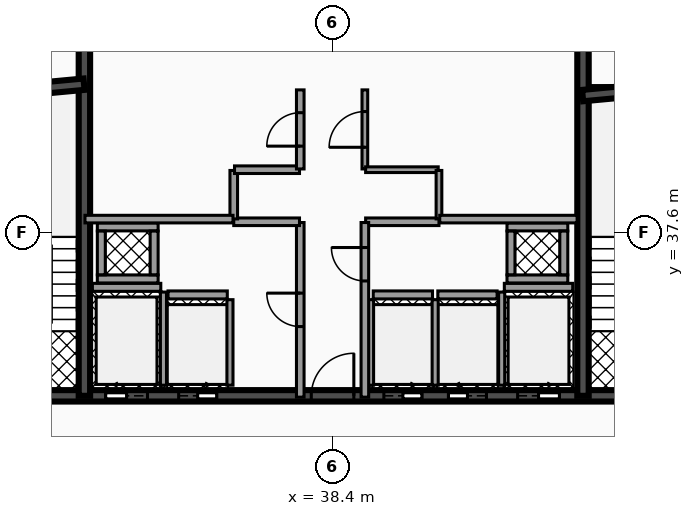
"""IFC4 building model, lengths in metres.
Left out: names, types, materials, properties, quantities, classifications, styles, units other than length and angle.
Written with IfcOpenShell. Run it as: python <this file> out.ifc"""

import sys

from ifc_helpers import new_model, si_unit, direction, frame, frame_2d, origin, place, context, subcontext, project, spatial, rectangle, extrude, element, fill, save


model = new_model("IFC4")
c1 = context("Model", 3, precision=1e-05, world=origin(), true_north=direction((0.0, 1.0)))
c2 = subcontext(c1, "Body", "Model", "MODEL_VIEW")
j1 = project(units=[si_unit("LENGTHUNIT", "METRE"), si_unit("PLANEANGLEUNIT", "RADIAN")], contexts=[c1])
p1 = place(None, origin())
s1 = spatial("IfcSite", under=j1, at=p1, CompositionType="ELEMENT")
p2 = place(p1, origin())
s2 = spatial("IfcBuilding", under=s1, at=p2, CompositionType="ELEMENT")
p3 = place(p2, frame((0.0, 0.0, 232.56)))
s3 = spatial("IfcBuildingStorey", under=s2, at=p3, CompositionType="ELEMENT", Elevation=232.56)
p4 = place(p3, frame((28.5, 33.3, 0.0), z_axis=(0.0, 0.0, 1.0), x_axis=(1.0, 0.0, 0.0)))
e1 = element("IfcWall", 1, at=p4, inside=s3, PredefinedType="SHEAR", context=c2, shape_type="SweptSolid", body=[
    extrude(rectangle(XDim=19.86, YDim=0.3, at=frame_2d((9.93, 0.0))), origin(), (0.0, 0.0, 1.0), 3.18),
])
p5 = place(p4, frame((3.93, 0.0, 0.0)))
e2 = element("IfcOpeningElement", 2, at=p5, cuts=e1, PredefinedType="OPENING", context=c2, shape_type="SweptSolid", body=[
    extrude(rectangle(XDim=1.1, YDim=2.15, at=frame_2d((0.55, 1.075))), frame((0.0, 0.16, 0.0), z_axis=(0.0, -1.0, 0.0), x_axis=(1.0, 0.0, 0.0)), (0.0, 0.0, 1.0), 0.32),
])
p6 = place(p4, frame((14.77, 0.0, 0.0)))
e3 = element("IfcOpeningElement", 3, at=p6, cuts=e1, PredefinedType="OPENING", context=c2, shape_type="SweptSolid", body=[
    extrude(rectangle(XDim=1.1, YDim=2.15, at=frame_2d((0.55, 1.075))), frame((0.0, 0.16, 0.0), z_axis=(0.0, -1.0, 0.0), x_axis=(1.0, 0.0, 0.0)), (0.0, 0.0, 1.0), 0.32),
])
p7 = place(p4, frame((11.25, 0.0, 0.0)))
e4 = element("IfcOpeningElement", 4, at=p7, cuts=e1, PredefinedType="OPENING", context=c2, shape_type="SweptSolid", body=[
    extrude(rectangle(XDim=1.0, YDim=2.1, at=frame_2d((0.5, 1.05))), frame((0.0, 0.16, 0.0), z_axis=(0.0, -1.0, 0.0), x_axis=(1.0, 0.0, 0.0)), (0.0, 0.0, 1.0), 0.32),
])
p8 = place(p4, frame((12.95, 0.0, 0.0)))
e5 = element("IfcOpeningElement", 5, at=p8, cuts=e1, PredefinedType="OPENING", context=c2, shape_type="SweptSolid", body=[
    extrude(rectangle(XDim=1.0, YDim=2.1, at=frame_2d((0.5, 1.05))), frame((0.0, 0.16, 0.0), z_axis=(0.0, -1.0, 0.0), x_axis=(1.0, 0.0, 0.0)), (0.0, 0.0, 1.0), 0.32),
])
p9 = place(p4, frame((5.85, 0.0, 0.0)))
e6 = element("IfcOpeningElement", 6, at=p9, cuts=e1, PredefinedType="OPENING", context=c2, shape_type="SweptSolid", body=[
    extrude(rectangle(XDim=1.0, YDim=2.1, at=frame_2d((0.5, 1.05))), frame((0.0, 0.16, 0.0), z_axis=(0.0, -1.0, 0.0), x_axis=(1.0, 0.0, 0.0)), (0.0, 0.0, 1.0), 0.32),
])
p10 = place(p4, frame((1.21, 0.0, 0.0)))
e7 = element("IfcOpeningElement", 7, at=p10, cuts=e1, PredefinedType="OPENING", context=c2, shape_type="SweptSolid", body=[
    extrude(rectangle(XDim=1.1, YDim=2.2, at=frame_2d((0.55, 1.1))), frame((0.0, 0.16, 0.0), z_axis=(0.0, -1.0, 0.0), x_axis=(1.0, 0.0, 0.0)), (0.0, 0.0, 1.0), 0.32),
])
p11 = place(p4, frame((9.34, 0.0, 0.0)))
e8 = element("IfcOpeningElement", 8, at=p11, cuts=e1, PredefinedType="OPENING", context=c2, shape_type="SweptSolid", body=[
    extrude(rectangle(XDim=1.12, YDim=2.05, at=frame_2d((0.56, 1.025))), frame((0.0, 0.16, 0.0), z_axis=(0.0, -1.0, 0.0), x_axis=(1.0, 0.0, 0.0)), (0.0, 0.0, 1.0), 0.32),
])
p12 = place(p4, frame((17.55, 0.0, 0.0)))
e9 = element("IfcOpeningElement", 9, at=p12, cuts=e1, PredefinedType="OPENING", context=c2, shape_type="SweptSolid", body=[
    extrude(rectangle(XDim=1.1, YDim=2.2, at=frame_2d((0.55, 1.1))), frame((0.0, 0.16, 0.0), z_axis=(0.0, -1.0, 0.0), x_axis=(1.0, 0.0, 0.0)), (0.0, 0.0, 1.0), 0.32),
])
for number, where, z_axis, x_axis in (
    (10, (31.87, 33.3, 0.0), (0.0, 0.0, 1.0), (0.0, 1.0, 0.0)),
    (11, (44.99, 33.3, 0.0), (0.0, 0.0, 1.0), (0.0, 1.0, 0.0)),
):
    element("IfcWall", number, at=place(p3, frame(where, z_axis=z_axis, x_axis=x_axis)), inside=s3, PredefinedType="SHEAR", context=c2, shape_type="SweptSolid", body=[
        extrude(rectangle(XDim=10.1, YDim=0.3, at=frame_2d((5.05, 0.0))), origin(), (0.0, 0.0, 1.0), 3.18),
    ])
p13 = place(p3, frame((28.64, 41.2, 0.0), z_axis=(0.0, 0.0, 1.0), x_axis=(0.995687118776, 0.092774789157, 0.0)))
e12 = element("IfcWall", 12, at=p13, inside=s3, PredefinedType="SHEAR", context=c2, shape_type="SweptSolid", body=[
    extrude(rectangle(XDim=3.234, YDim=0.3, at=frame_2d((1.617, 0.0))), origin(), (0.0, 0.0, 1.0), 3.18),
])
p14 = place(p3, frame((44.98, 41.2, 0.0), z_axis=(0.0, 0.0, 1.0), x_axis=(0.995686468965, 0.09278176286, 0.0)))
e13 = element("IfcWall", 13, at=p14, inside=s3, PredefinedType="SHEAR", context=c2, shape_type="SweptSolid", body=[
    extrude(rectangle(XDim=3.234, YDim=0.3, at=frame_2d((1.617, 0.0))), origin(), (0.0, 0.0, 1.0), 3.18),
])
p15 = place(p3, frame((32.08, 36.155, 0.0), z_axis=(0.0, 0.0, 1.0), x_axis=(1.0, 0.0, 0.0)))
e14 = element("IfcWall", 14, at=p15, inside=s3, PredefinedType="SOLIDWALL", context=c2, shape_type="SweptSolid", body=[
    extrude(rectangle(XDim=1.8, YDim=0.21, at=frame_2d((0.9, 0.0))), origin(), (0.0, 0.0, 1.0), 3.18),
])
p16 = place(p3, frame((33.95, 33.58, 0.0), z_axis=(0.0, 0.0, 1.0), x_axis=(0.0, 1.0, 0.0)))
e15 = element("IfcWall", 15, at=p16, inside=s3, PredefinedType="SOLIDWALL", context=c2, shape_type="SweptSolid", body=[
    extrude(rectangle(XDim=2.45, YDim=0.16, at=frame_2d((1.225, 0.0))), origin(), (0.0, 0.0, 1.0), 3.18),
])
p17 = place(p3, frame((42.92, 36.155, 0.0), z_axis=(0.0, 0.0, 1.0), x_axis=(1.0, 0.0, 0.0)))
e16 = element("IfcWall", 16, at=p17, inside=s3, PredefinedType="SOLIDWALL", context=c2, shape_type="SweptSolid", body=[
    extrude(rectangle(XDim=1.8, YDim=0.21, at=frame_2d((0.9, 0.0))), origin(), (0.0, 0.0, 1.0), 3.18),
])
p18 = place(p3, frame((42.85, 33.58, 0.0), z_axis=(0.0, 0.0, 1.0), x_axis=(0.0, 1.0, 0.0)))
e17 = element("IfcWall", 17, at=p18, inside=s3, PredefinedType="SOLIDWALL", context=c2, shape_type="SweptSolid", body=[
    extrude(rectangle(XDim=2.45, YDim=0.16, at=frame_2d((1.225, 0.0))), origin(), (0.0, 0.0, 1.0), 3.18),
])
p19 = place(p3, frame((39.47, 35.955, 0.0), z_axis=(0.0, 0.0, 1.0), x_axis=(1.0, 0.0, 0.0)))
e18 = element("IfcWall", 18, at=p19, inside=s3, PredefinedType="SOLIDWALL", context=c2, shape_type="SweptSolid", body=[
    extrude(rectangle(XDim=1.56, YDim=0.21, at=frame_2d((0.78, 0.0))), origin(), (0.0, 0.0, 1.0), 3.18),
])
for number, where, z_axis, x_axis in (
    (19, (39.4, 33.58, 0.0), (0.0, 0.0, 1.0), (0.0, 1.0, 0.0)),
    (20, (41.1, 33.58, 0.0), (0.0, 0.0, 1.0), (0.0, 1.0, 0.0)),
):
    element("IfcWall", number, at=place(p3, frame(where, z_axis=z_axis, x_axis=x_axis)), inside=s3, PredefinedType="SOLIDWALL", context=c2, shape_type="SweptSolid", body=[
        extrude(rectangle(XDim=2.25, YDim=0.16, at=frame_2d((1.125, 0.0))), origin(), (0.0, 0.0, 1.0), 3.18),
    ])
p20 = place(p3, frame((41.17, 35.955, 0.0), z_axis=(0.0, 0.0, 1.0), x_axis=(1.0, 0.0, 0.0)))
e21 = element("IfcWall", 21, at=p20, inside=s3, PredefinedType="SOLIDWALL", context=c2, shape_type="SweptSolid", body=[
    extrude(rectangle(XDim=1.56, YDim=0.21, at=frame_2d((0.78, 0.0))), origin(), (0.0, 0.0, 1.0), 3.18),
])
p21 = place(p3, frame((34.07, 35.955, 0.0), z_axis=(0.0, 0.0, 1.0), x_axis=(1.0, 0.0, 0.0)))
e22 = element("IfcWall", 22, at=p21, inside=s3, PredefinedType="SOLIDWALL", context=c2, shape_type="SweptSolid", body=[
    extrude(rectangle(XDim=1.56, YDim=0.21, at=frame_2d((0.78, 0.0))), origin(), (0.0, 0.0, 1.0), 3.18),
])
p22 = place(p3, frame((35.7, 33.58, 0.0), z_axis=(0.0, 0.0, 1.0), x_axis=(0.0, 1.0, 0.0)))
e23 = element("IfcWall", 23, at=p22, inside=s3, PredefinedType="SOLIDWALL", context=c2, shape_type="SweptSolid", body=[
    extrude(rectangle(XDim=2.25, YDim=0.16, at=frame_2d((1.125, 0.0))), origin(), (0.0, 0.0, 1.0), 3.18),
])
for number, where, z_axis, x_axis in (
    (24, (32.21, 36.375, 0.0), (0.0, 0.0, 1.0), (1.0, 0.0, 0.0)),
    (25, (32.21, 37.745, 0.0), (0.0, 0.0, 1.0), (1.0, 0.0, 0.0)),
):
    element("IfcWall", number, at=place(p3, frame(where, z_axis=z_axis, x_axis=x_axis)), inside=s3, PredefinedType="SOLIDWALL", context=c2, shape_type="SweptSolid", body=[
        extrude(rectangle(XDim=1.6, YDim=0.21, at=frame_2d((0.8, 0.0))), origin(), (0.0, 0.0, 1.0), 3.18),
    ])
for number, where, z_axis, x_axis in (
    (26, (32.315, 36.485, 0.0), (0.0, 0.0, 1.0), (0.0, 1.0, 0.0)),
    (27, (33.705, 36.485, 0.0), (0.0, 0.0, 1.0), (0.0, 1.0, 0.0)),
):
    element("IfcWall", number, at=place(p3, frame(where, z_axis=z_axis, x_axis=x_axis)), inside=s3, PredefinedType="SOLIDWALL", context=c2, shape_type="SweptSolid", body=[
        extrude(rectangle(XDim=1.15, YDim=0.21, at=frame_2d((0.575, 0.0))), origin(), (0.0, 0.0, 1.0), 3.18),
    ])
for number, where, z_axis, x_axis in (
    (28, (42.99, 36.375, 0.0), (0.0, 0.0, 1.0), (1.0, 0.0, 0.0)),
    (29, (42.99, 37.745, 0.0), (0.0, 0.0, 1.0), (1.0, 0.0, 0.0)),
):
    element("IfcWall", number, at=place(p3, frame(where, z_axis=z_axis, x_axis=x_axis)), inside=s3, PredefinedType="SOLIDWALL", context=c2, shape_type="SweptSolid", body=[
        extrude(rectangle(XDim=1.6, YDim=0.21, at=frame_2d((0.8, 0.0))), origin(), (0.0, 0.0, 1.0), 3.18),
    ])
for number, where, z_axis, x_axis in (
    (30, (43.095, 36.485, 0.0), (0.0, 0.0, 1.0), (0.0, 1.0, 0.0)),
    (31, (44.485, 36.485, 0.0), (0.0, 0.0, 1.0), (0.0, 1.0, 0.0)),
):
    element("IfcWall", number, at=place(p3, frame(where, z_axis=z_axis, x_axis=x_axis)), inside=s3, PredefinedType="SOLIDWALL", context=c2, shape_type="SweptSolid", body=[
        extrude(rectangle(XDim=1.15, YDim=0.21, at=frame_2d((0.575, 0.0))), origin(), (0.0, 0.0, 1.0), 3.18),
    ])
p23 = place(p3, frame((37.55, 33.265, 0.0), z_axis=(0.0, 0.0, 1.0), x_axis=(0.0, 1.0, 0.0)))
e32 = element("IfcWall", 32, at=p23, inside=s3, PredefinedType="PARTITIONING", context=c2, shape_type="SweptSolid", body=[
    extrude(rectangle(XDim=4.595, YDim=0.2, at=frame_2d((2.298, 0.0))), origin(), (0.0, 0.0, 1.0), 2.235),
])
p24 = place(p23, frame((1.857, 0.0, 0.0)))
e33 = element("IfcOpeningElement", 33, at=p24, cuts=e32, PredefinedType="OPENING", context=c2, shape_type="SweptSolid", body=[
    extrude(rectangle(XDim=0.88, YDim=2.05, at=frame_2d((0.44, 1.025))), frame((0.0, 0.11, 0.0), z_axis=(0.0, -1.0, 0.0), x_axis=(1.0, 0.0, 0.0)), (0.0, 0.0, 1.0), 0.22),
])
p25 = place(p3, frame((35.8, 37.88, 0.0), z_axis=(0.0, 0.0, 1.0), x_axis=(1.0, 0.0, 0.0)))
e34 = element("IfcWall", 34, at=p25, inside=s3, PredefinedType="PARTITIONING", context=c2, shape_type="SweptSolid", body=[
    extrude(rectangle(XDim=1.73, YDim=0.2, at=frame_2d((0.865, 0.0))), origin(), (0.0, 0.0, 1.0), 2.235),
])
p26 = place(p3, frame((35.8, 37.955, 0.0), z_axis=(0.0, 0.0, 1.0), x_axis=(0.0, 1.0, 0.0)))
e35 = element("IfcWall", 35, at=p26, inside=s3, PredefinedType="PARTITIONING", context=c2, shape_type="SweptSolid", body=[
    extrude(rectangle(XDim=1.275, YDim=0.2, at=frame_2d((0.637, 0.0))), origin(), (0.0, 0.0, 1.0), 2.235),
])
p27 = place(p3, frame((35.82, 39.25, 0.0), z_axis=(0.0, 0.0, 1.0), x_axis=(1.0, 0.0, 0.0)))
e36 = element("IfcWall", 36, at=p27, inside=s3, PredefinedType="PARTITIONING", context=c2, shape_type="SweptSolid", body=[
    extrude(rectangle(XDim=1.71, YDim=0.2, at=frame_2d((0.855, 0.0))), origin(), (0.0, 0.0, 1.0), 2.235),
])
p28 = place(p3, frame((37.55, 39.27, 0.0), z_axis=(0.0, 0.0, 1.0), x_axis=(0.0, 1.0, 0.0)))
e37 = element("IfcWall", 37, at=p28, inside=s3, PredefinedType="PARTITIONING", context=c2, shape_type="SweptSolid", body=[
    extrude(rectangle(XDim=2.08, YDim=0.2, at=frame_2d((1.04, 0.0))), origin(), (0.0, 0.0, 1.0), 2.235),
])
p29 = place(p28, frame((0.6, 0.0, 0.0)))
e38 = element("IfcOpeningElement", 38, at=p29, cuts=e37, PredefinedType="OPENING", context=c2, shape_type="SweptSolid", body=[
    extrude(rectangle(XDim=0.88, YDim=2.05, at=frame_2d((0.44, 1.025))), frame((0.0, 0.11, 0.0), z_axis=(0.0, -1.0, 0.0), x_axis=(1.0, 0.0, 0.0)), (0.0, 0.0, 1.0), 0.22),
])
p30 = place(p3, frame((39.27, 37.88, 0.0), z_axis=(0.0, 0.0, 1.0), x_axis=(1.0, 0.0, 0.0)))
e39 = element("IfcWall", 39, at=p30, inside=s3, PredefinedType="PARTITIONING", context=c2, shape_type="SweptSolid", body=[
    extrude(rectangle(XDim=1.93, YDim=0.2, at=frame_2d((0.965, 0.0))), origin(), (0.0, 0.0, 1.0), 2.235),
])
p31 = place(p3, frame((39.25, 33.265, 0.0), z_axis=(0.0, 0.0, 1.0), x_axis=(0.0, 1.0, 0.0)))
e40 = element("IfcWall", 40, at=p31, inside=s3, PredefinedType="PARTITIONING", context=c2, shape_type="SweptSolid", body=[
    extrude(rectangle(XDim=4.595, YDim=0.2, at=frame_2d((2.298, 0.0))), origin(), (0.0, 0.0, 1.0), 2.235),
])
p32 = place(p31, frame((3.058, 0.0, 0.0)))
e41 = element("IfcOpeningElement", 41, at=p32, cuts=e40, PredefinedType="OPENING", context=c2, shape_type="SweptSolid", body=[
    extrude(rectangle(XDim=0.88, YDim=2.05, at=frame_2d((0.44, 1.025))), frame((0.0, 0.11, 0.0), z_axis=(0.0, -1.0, 0.0), x_axis=(1.0, 0.0, 0.0)), (0.0, 0.0, 1.0), 0.22),
])
p33 = place(p3, frame((39.25, 39.27, 0.0), z_axis=(0.0, 0.0, 1.0), x_axis=(0.0, 1.0, 0.0)))
e42 = element("IfcWall", 42, at=p33, inside=s3, PredefinedType="PARTITIONING", context=c2, shape_type="SweptSolid", body=[
    extrude(rectangle(XDim=2.08, YDim=0.15, at=frame_2d((1.04, 0.0))), origin(), (0.0, 0.0, 1.0), 2.235),
])
p34 = place(p33, frame((0.57, 0.0, 0.0)))
e43 = element("IfcOpeningElement", 43, at=p34, cuts=e42, PredefinedType="OPENING", context=c2, shape_type="SweptSolid", body=[
    extrude(rectangle(XDim=0.94, YDim=2.05, at=frame_2d((0.47, 1.025))), frame((0.0, 0.085, 0.0), z_axis=(0.0, -1.0, 0.0), x_axis=(1.0, 0.0, 0.0)), (0.0, 0.0, 1.0), 0.17),
])
p35 = place(p3, frame((39.27, 39.25, 0.0), z_axis=(0.0, 0.0, 1.0), x_axis=(1.0, 0.0, 0.0)))
e44 = element("IfcWall", 44, at=p35, inside=s3, PredefinedType="PARTITIONING", context=c2, shape_type="SweptSolid", body=[
    extrude(rectangle(XDim=1.91, YDim=0.15, at=frame_2d((0.955, 0.0))), origin(), (0.0, 0.0, 1.0), 2.235),
])
p36 = place(p3, frame((41.2, 37.955, 0.0), z_axis=(0.0, 0.0, 1.0), x_axis=(0.0, 1.0, 0.0)))
e45 = element("IfcWall", 45, at=p36, inside=s3, PredefinedType="PARTITIONING", context=c2, shape_type="SweptSolid", body=[
    extrude(rectangle(XDim=1.275, YDim=0.15, at=frame_2d((0.637, 0.0))), origin(), (0.0, 0.0, 1.0), 2.235),
])
p37 = place(p3, frame((31.885, 37.95, 0.0), z_axis=(0.0, 0.0, 1.0), x_axis=(1.0, 0.0, 0.0)))
e46 = element("IfcWall", 46, at=p37, inside=s3, PredefinedType="PARTITIONING", context=c2, shape_type="SweptSolid", body=[
    extrude(rectangle(XDim=3.895, YDim=0.2, at=frame_2d((1.948, 0.0))), origin(), (0.0, 0.0, 1.0), 2.235),
])
p38 = place(p3, frame((41.22, 37.95, 0.0), z_axis=(0.0, 0.0, 1.0), x_axis=(1.0, 0.0, 0.0)))
e47 = element("IfcWall", 47, at=p38, inside=s3, PredefinedType="PARTITIONING", context=c2, shape_type="SweptSolid", body=[
    extrude(rectangle(XDim=3.615, YDim=0.2, at=frame_2d((1.808, 0.0))), origin(), (0.0, 0.0, 1.0), 2.235),
])
p39 = place(p5, origin())
e48 = element("IfcDoor", 48, at=p39, inside=s3, OperationType="SLIDING_TO_LEFT", PredefinedType="DOOR", context=c2, shape_type="SweptSolid", body=[
    extrude(rectangle(XDim=1.1, YDim=2.15, at=frame_2d((0.55, 1.075))), frame((0.0, 0.025, 0.0), z_axis=(0.0, -1.0, 0.0), x_axis=(1.0, 0.0, 0.0)), (0.0, 0.0, 1.0), 0.05),
])
fill(e2, e48)
p40 = place(p6, origin())
e49 = element("IfcDoor", 49, at=p40, inside=s3, OperationType="SLIDING_TO_RIGHT", PredefinedType="DOOR", context=c2, shape_type="SweptSolid", body=[
    extrude(rectangle(XDim=1.1, YDim=2.15, at=frame_2d((0.55, 1.075))), frame((0.0, 0.025, 0.0), z_axis=(0.0, -1.0, 0.0), x_axis=(1.0, 0.0, 0.0)), (0.0, 0.0, 1.0), 0.05),
])
fill(e3, e49)
p41 = place(p7, origin())
e50 = element("IfcDoor", 50, at=p41, inside=s3, OperationType="SLIDING_TO_RIGHT", PredefinedType="DOOR", context=c2, shape_type="SweptSolid", body=[
    extrude(rectangle(XDim=1.0, YDim=2.1, at=frame_2d((0.5, 1.05))), frame((0.0, 0.025, 0.0), z_axis=(0.0, -1.0, 0.0), x_axis=(1.0, 0.0, 0.0)), (0.0, 0.0, 1.0), 0.05),
])
fill(e4, e50)
p42 = place(p8, origin())
e51 = element("IfcDoor", 51, at=p42, inside=s3, OperationType="SLIDING_TO_LEFT", PredefinedType="DOOR", context=c2, shape_type="SweptSolid", body=[
    extrude(rectangle(XDim=1.0, YDim=2.1, at=frame_2d((0.5, 1.05))), frame((0.0, 0.025, 0.0), z_axis=(0.0, -1.0, 0.0), x_axis=(1.0, 0.0, 0.0)), (0.0, 0.0, 1.0), 0.05),
])
fill(e5, e51)
p43 = place(p9, origin())
e52 = element("IfcDoor", 52, at=p43, inside=s3, OperationType="SLIDING_TO_RIGHT", PredefinedType="DOOR", context=c2, shape_type="SweptSolid", body=[
    extrude(rectangle(XDim=1.0, YDim=2.1, at=frame_2d((0.5, 1.05))), frame((0.0, 0.025, 0.0), z_axis=(0.0, -1.0, 0.0), x_axis=(1.0, 0.0, 0.0)), (0.0, 0.0, 1.0), 0.05),
])
fill(e6, e52)
p44 = place(p11, origin())
e53 = element("IfcDoor", 53, at=p44, inside=s3, OperationType="SINGLE_SWING_RIGHT", PredefinedType="DOOR", context=c2, shape_type="SweptSolid", body=[
    extrude(rectangle(XDim=1.12, YDim=2.05, at=frame_2d((0.56, 1.025))), frame((0.0, 0.025, 0.0), z_axis=(0.0, -1.0, 0.0), x_axis=(1.0, 0.0, 0.0)), (0.0, 0.0, 1.0), 0.05),
])
fill(e8, e53)
p45 = place(p24, origin())
e54 = element("IfcDoor", 54, at=p45, inside=s3, OperationType="SINGLE_SWING_RIGHT", PredefinedType="DOOR", context=c2, shape_type="SweptSolid", body=[
    extrude(rectangle(XDim=0.88, YDim=2.05, at=frame_2d((0.44, 1.025))), frame((0.0, 0.025, 0.0), z_axis=(0.0, -1.0, 0.0), x_axis=(1.0, 0.0, 0.0)), (0.0, 0.0, 1.0), 0.05),
])
fill(e33, e54)
p46 = place(p29, origin())
e55 = element("IfcDoor", 55, at=p46, inside=s3, OperationType="SINGLE_SWING_LEFT", PredefinedType="DOOR", context=c2, shape_type="SweptSolid", body=[
    extrude(rectangle(XDim=0.88, YDim=2.05, at=frame_2d((0.44, 1.025))), frame((0.0, 0.025, 0.0), z_axis=(0.0, -1.0, 0.0), x_axis=(1.0, 0.0, 0.0)), (0.0, 0.0, 1.0), 0.05),
])
fill(e38, e55)
p47 = place(p32, origin())
e56 = element("IfcDoor", 56, at=p47, inside=s3, OperationType="SINGLE_SWING_RIGHT", PredefinedType="DOOR", context=c2, shape_type="SweptSolid", body=[
    extrude(rectangle(XDim=0.88, YDim=2.05, at=frame_2d((0.44, 1.025))), frame((0.0, 0.025, 0.0), z_axis=(0.0, -1.0, 0.0), x_axis=(1.0, 0.0, 0.0)), (0.0, 0.0, 1.0), 0.05),
])
fill(e41, e56)
p48 = place(p34, origin())
e57 = element("IfcDoor", 57, at=p48, inside=s3, OperationType="SINGLE_SWING_LEFT", PredefinedType="DOOR", context=c2, shape_type="SweptSolid", body=[
    extrude(rectangle(XDim=0.94, YDim=2.05, at=frame_2d((0.47, 1.025))), frame((0.0, 0.025, 0.0), z_axis=(0.0, -1.0, 0.0), x_axis=(1.0, 0.0, 0.0)), (0.0, 0.0, 1.0), 0.05),
])
fill(e43, e57)
save(model, sys.argv[1])
